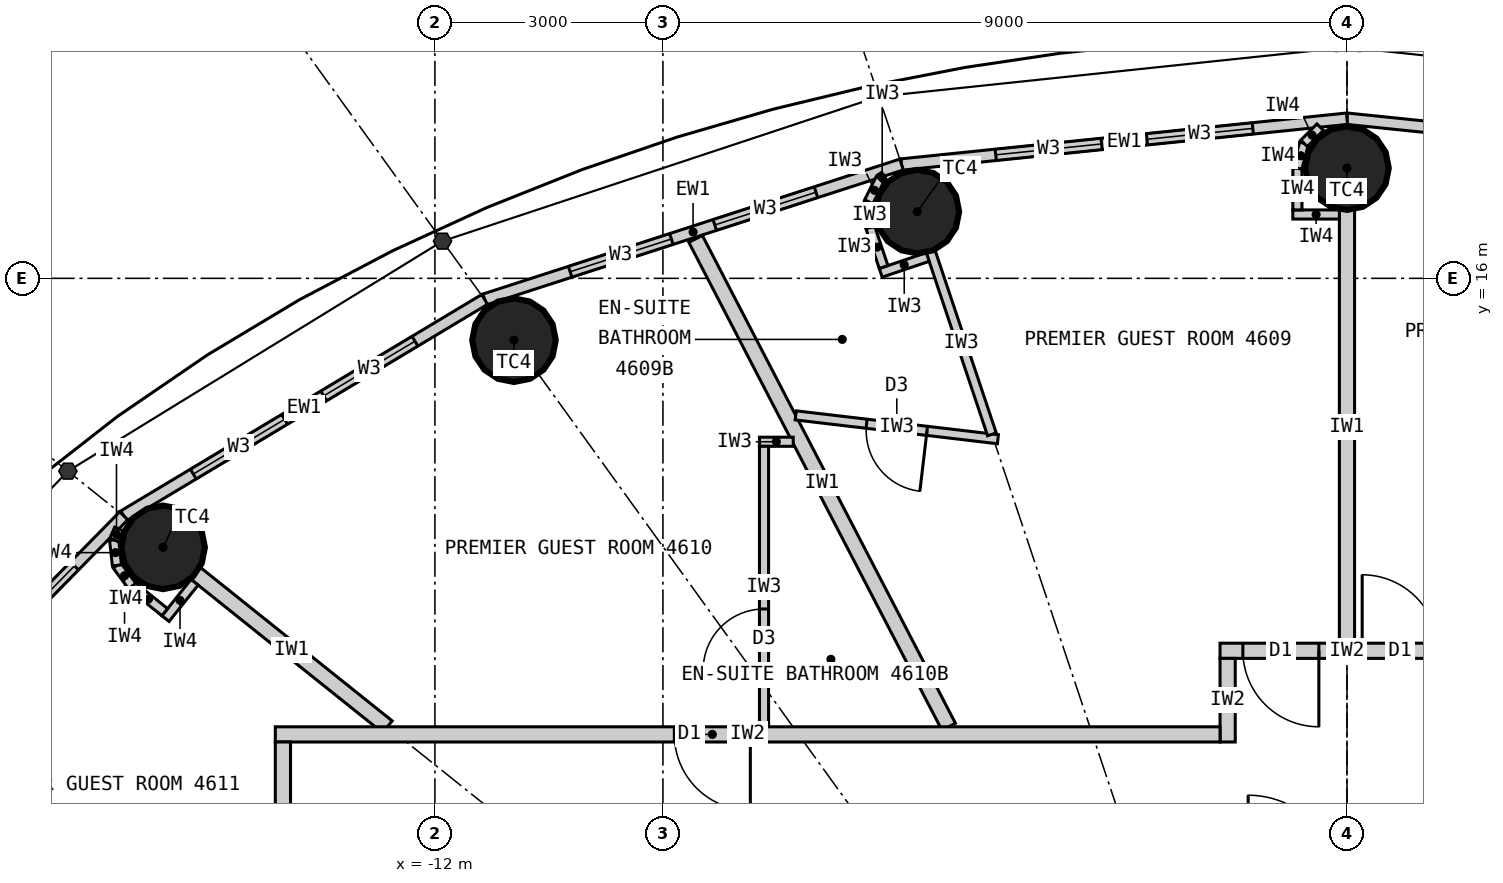
"""IFC4 building model, lengths in metres.
Left out: names, types, materials, properties, quantities, classifications, styles, units other than length and angle.
Written with IfcOpenShell. Run it as: python <this file> out.ifc"""

import sys

from ifc_helpers import new_model, si_unit, direction, frame, frame_2d, origin, origin_2d, place, context, subcontext, project, spatial, rectangle, circle, extrude, element, fill, save


model = new_model("IFC4")
c1 = context("Model", 3, precision=1e-05, world=origin(), true_north=direction((0.0, 1.0)))
c2 = subcontext(c1, "Body", "Model", "MODEL_VIEW")
j1 = project(units=[si_unit("LENGTHUNIT", "METRE"), si_unit("PLANEANGLEUNIT", "RADIAN")], contexts=[c1])
p1 = place(None, origin())
s1 = spatial("IfcSite", under=j1, at=p1, CompositionType="ELEMENT")
p2 = place(p1, origin())
s2 = spatial("IfcBuilding", under=s1, at=p2, CompositionType="ELEMENT")
p3 = place(p2, frame((0.0, 0.0, 173.1)))
s3 = spatial("IfcBuildingStorey", under=s2, at=p3, CompositionType="ELEMENT", Elevation=173.1)
for number, where, z_axis, x_axis in (
    (1, (0.0, 17.45, 0.0), (0.0, 0.0, 1.0), (1.0, 0.0, 0.0)),
    (2, (-5.653, 16.877, 0.0), (0.0, 0.0, 1.0), (1.0, 0.0, 0.0)),
    (3, (-10.96, 15.186, 0.0), (0.0, 0.0, 1.0), (1.0, 0.0, 0.0)),
    (4, (-15.576, 12.461, 0.0), (0.0, 0.0, 1.0), (1.0, 0.0, 0.0)),
):
    element("IfcColumn", number, at=place(p3, frame(where, z_axis=z_axis, x_axis=x_axis)), inside=s3, PredefinedType="COLUMN", context=c2, shape_type="SweptSolid", body=[
        extrude(circle(Radius=0.55, at=origin_2d()), origin(), (0.0, 0.0, 1.0), 3.3),
    ])
p4 = place(p3, frame((5.86, 17.497, 0.0), z_axis=(0.0, 0.0, 1.0), x_axis=(-0.994751738032, 0.102318032045, 0.0)))
e5 = element("IfcWall", 5, at=p4, inside=s3, PredefinedType="ELEMENTEDWALL", context=c2, shape_type="SweptSolid", body=[
    extrude(rectangle(XDim=5.891, YDim=0.15, at=frame_2d((2.946, 0.0))), origin(), (0.0, 0.0, 1.0), 3.12),
])
p5 = place(p4, frame((1.246, 0.0, 0.9)))
e6 = element("IfcOpeningElement", 6, at=p5, cuts=e5, PredefinedType="OPENING", context=c2, shape_type="SweptSolid", body=[
    extrude(rectangle(XDim=1.4, YDim=1.9, at=frame_2d((0.7, 0.95))), frame((0.0, 0.085, 0.0), z_axis=(0.0, -1.0, 0.0), x_axis=(1.0, 0.0, 0.0)), (0.0, 0.0, 1.0), 0.17),
])
p6 = place(p4, frame((3.246, 0.0, 0.9)))
e7 = element("IfcOpeningElement", 7, at=p6, cuts=e5, PredefinedType="OPENING", context=c2, shape_type="SweptSolid", body=[
    extrude(rectangle(XDim=1.4, YDim=1.9, at=frame_2d((0.7, 0.95))), frame((0.0, 0.085, 0.0), z_axis=(0.0, -1.0, 0.0), x_axis=(1.0, 0.0, 0.0)), (0.0, 0.0, 1.0), 0.17),
])
p7 = place(p3, frame((0.0, 18.1, 0.0), z_axis=(0.0, 0.0, 1.0), x_axis=(-0.994751738032, -0.102318032045, 0.0)))
e8 = element("IfcWall", 8, at=p7, inside=s3, PredefinedType="ELEMENTEDWALL", context=c2, shape_type="SweptSolid", body=[
    extrude(rectangle(XDim=5.891, YDim=0.15, at=frame_2d((2.946, 0.0))), origin(), (0.0, 0.0, 1.0), 3.12),
])
p8 = place(p7, frame((1.246, 0.0, 0.9)))
e9 = element("IfcOpeningElement", 9, at=p8, cuts=e8, PredefinedType="OPENING", context=c2, shape_type="SweptSolid", body=[
    extrude(rectangle(XDim=1.4, YDim=1.9, at=frame_2d((0.7, 0.95))), frame((0.0, 0.085, 0.0), z_axis=(0.0, -1.0, 0.0), x_axis=(1.0, 0.0, 0.0)), (0.0, 0.0, 1.0), 0.17),
])
p9 = place(p7, frame((3.246, 0.0, 0.9)))
e10 = element("IfcOpeningElement", 10, at=p9, cuts=e8, PredefinedType="OPENING", context=c2, shape_type="SweptSolid", body=[
    extrude(rectangle(XDim=1.4, YDim=1.9, at=frame_2d((0.7, 0.95))), frame((0.0, 0.085, 0.0), z_axis=(0.0, -1.0, 0.0), x_axis=(1.0, 0.0, 0.0)), (0.0, 0.0, 1.0), 0.17),
])
p10 = place(p3, frame((-5.86, 17.497, 0.0), z_axis=(0.0, 0.0, 1.0), x_axis=(-0.951432482129, -0.307857486429, 0.0)))
e11 = element("IfcWall", 11, at=p10, inside=s3, PredefinedType="ELEMENTEDWALL", context=c2, shape_type="SweptSolid", body=[
    extrude(rectangle(XDim=5.766, YDim=0.15, at=frame_2d((2.883, 0.0))), origin(), (0.0, 0.0, 1.0), 3.12),
])
p11 = place(p10, frame((1.183, 0.0, 0.9)))
e12 = element("IfcOpeningElement", 12, at=p11, cuts=e11, PredefinedType="OPENING", context=c2, shape_type="SweptSolid", body=[
    extrude(rectangle(XDim=1.4, YDim=1.9, at=frame_2d((0.7, 0.95))), frame((0.0, 0.085, 0.0), z_axis=(0.0, -1.0, 0.0), x_axis=(1.0, 0.0, 0.0)), (0.0, 0.0, 1.0), 0.17),
])
p12 = place(p10, frame((3.183, 0.0, 0.9)))
e13 = element("IfcOpeningElement", 13, at=p12, cuts=e11, PredefinedType="OPENING", context=c2, shape_type="SweptSolid", body=[
    extrude(rectangle(XDim=1.4, YDim=1.9, at=frame_2d((0.7, 0.95))), frame((0.0, 0.085, 0.0), z_axis=(0.0, -1.0, 0.0), x_axis=(1.0, 0.0, 0.0)), (0.0, 0.0, 1.0), 0.17),
])
p13 = place(p3, frame((-11.346, 15.722, 0.0), z_axis=(0.0, 0.0, 1.0), x_axis=(-0.857695199231, -0.514158482587, 0.0)))
e14 = element("IfcWall", 14, at=p13, inside=s3, PredefinedType="ELEMENTEDWALL", context=c2, shape_type="SweptSolid", body=[
    extrude(rectangle(XDim=5.536, YDim=0.15, at=frame_2d((2.768, 0.0))), origin(), (0.0, 0.0, 1.0), 3.12),
])
p14 = place(p13, frame((1.068, 0.0, 0.9)))
e15 = element("IfcOpeningElement", 15, at=p14, cuts=e14, PredefinedType="OPENING", context=c2, shape_type="SweptSolid", body=[
    extrude(rectangle(XDim=1.4, YDim=1.9, at=frame_2d((0.7, 0.95))), frame((0.0, 0.085, 0.0), z_axis=(0.0, -1.0, 0.0), x_axis=(1.0, 0.0, 0.0)), (0.0, 0.0, 1.0), 0.17),
])
p15 = place(p13, frame((3.068, 0.0, 0.9)))
e16 = element("IfcOpeningElement", 16, at=p15, cuts=e14, PredefinedType="OPENING", context=c2, shape_type="SweptSolid", body=[
    extrude(rectangle(XDim=1.4, YDim=1.9, at=frame_2d((0.7, 0.95))), frame((0.0, 0.085, 0.0), z_axis=(0.0, -1.0, 0.0), x_axis=(1.0, 0.0, 0.0)), (0.0, 0.0, 1.0), 0.17),
])
p16 = place(p3, frame((-16.095, 12.876, 0.0), z_axis=(0.0, 0.0, 1.0), x_axis=(-0.700727467776, -0.71342905457, 0.0)))
e17 = element("IfcWall", 17, at=p16, inside=s3, PredefinedType="ELEMENTEDWALL", context=c2, shape_type="SweptSolid", body=[
    extrude(rectangle(XDim=5.247, YDim=0.15, at=frame_2d((2.624, 0.0))), origin(), (0.0, 0.0, 1.0), 3.12),
])
p17 = place(p16, frame((0.924, 0.0, 0.9)))
e18 = element("IfcOpeningElement", 18, at=p17, cuts=e17, PredefinedType="OPENING", context=c2, shape_type="SweptSolid", body=[
    extrude(rectangle(XDim=1.4, YDim=1.9, at=frame_2d((0.7, 0.95))), frame((0.0, 0.085, 0.0), z_axis=(0.0, -1.0, 0.0), x_axis=(1.0, 0.0, 0.0)), (0.0, 0.0, 1.0), 0.17),
])
p18 = place(p16, frame((2.924, 0.0, 0.9)))
e19 = element("IfcOpeningElement", 19, at=p18, cuts=e17, PredefinedType="OPENING", context=c2, shape_type="SweptSolid", body=[
    extrude(rectangle(XDim=1.4, YDim=1.9, at=frame_2d((0.7, 0.95))), frame((0.0, 0.085, 0.0), z_axis=(0.0, -1.0, 0.0), x_axis=(1.0, 0.0, 0.0)), (0.0, 0.0, 1.0), 0.17),
])
p19 = place(p3, frame((0.0, 11.2, 0.0), z_axis=(0.0, 0.0, 1.0), x_axis=(0.0, 1.0, 0.0)))
e20 = element("IfcWall", 20, at=p19, inside=s3, PredefinedType="PARTITIONING", context=c2, shape_type="SweptSolid", body=[
    extrude(rectangle(XDim=5.7, YDim=0.2, at=frame_2d((2.85, 0.0))), origin(), (0.0, 0.0, 1.0), 2.42),
])
p20 = place(p3, frame((-5.24, 10.1, 0.0), z_axis=(0.0, 0.0, 1.0), x_axis=(-0.460532965373, 0.887642601391, 0.0)))
e21 = element("IfcWall", 21, at=p20, inside=s3, PredefinedType="PARTITIONING", context=c2, shape_type="SweptSolid", body=[
    extrude(rectangle(XDim=7.231, YDim=0.2, at=frame_2d((3.616, 0.0))), origin(), (0.0, 0.0, 1.0), 3.12),
])
p21 = place(p3, frame((-12.625, 10.1, 0.0), z_axis=(0.0, 0.0, 1.0), x_axis=(-0.780876185034, 0.624685827954, 0.0)))
e22 = element("IfcWall", 22, at=p21, inside=s3, PredefinedType="PARTITIONING", context=c2, shape_type="SweptSolid", body=[
    extrude(rectangle(XDim=3.229, YDim=0.2, at=frame_2d((1.615, 0.0))), origin(), (0.0, 0.0, 1.0), 2.42),
])
p22 = place(p3, frame((-1.67, 11.1, 0.0), z_axis=(0.0, 0.0, 1.0), x_axis=(1.0, 0.0, 0.0)))
e23 = element("IfcWall", 23, at=p22, inside=s3, PredefinedType="PARTITIONING", context=c2, shape_type="SweptSolid", body=[
    extrude(rectangle(XDim=3.34, YDim=0.2, at=frame_2d((1.67, 0.0))), origin(), (0.0, 0.0, 1.0), 3.12),
])
p23 = place(p22, frame((1.87, 0.0, 0.0)))
e24 = element("IfcOpeningElement", 24, at=p23, cuts=e23, PredefinedType="OPENING", context=c2, shape_type="SweptSolid", body=[
    extrude(rectangle(XDim=1.0, YDim=2.2, at=frame_2d((0.5, 1.1))), frame((0.0, 0.11, 0.0), z_axis=(0.0, -1.0, 0.0), x_axis=(1.0, 0.0, 0.0)), (0.0, 0.0, 1.0), 0.22),
])
p24 = place(p22, frame((0.3, 0.0, 0.0)))
e25 = element("IfcOpeningElement", 25, at=p24, cuts=e23, PredefinedType="OPENING", context=c2, shape_type="SweptSolid", body=[
    extrude(rectangle(XDim=1.0, YDim=2.2, at=frame_2d((0.5, 1.1))), frame((0.0, 0.11, 0.0), z_axis=(0.0, -1.0, 0.0), x_axis=(1.0, 0.0, 0.0)), (0.0, 0.0, 1.0), 0.22),
])
p25 = place(p3, frame((-1.57, 9.9, 0.0), z_axis=(0.0, 0.0, 1.0), x_axis=(0.0, 1.0, 0.0)))
e26 = element("IfcWall", 26, at=p25, inside=s3, PredefinedType="PARTITIONING", context=c2, shape_type="SweptSolid", body=[
    extrude(rectangle(XDim=1.1, YDim=0.2, at=frame_2d((0.55, 0.0))), origin(), (0.0, 0.0, 1.0), 3.12),
])
p26 = place(p3, frame((-7.253, 14.197, 0.0), z_axis=(0.0, 0.0, 1.0), x_axis=(0.993128188393, -0.117031625725, 0.0)))
e27 = element("IfcWall", 27, at=p26, inside=s3, PredefinedType="PARTITIONING", context=c2, shape_type="SweptSolid", body=[
    extrude(rectangle(XDim=2.678, YDim=0.12, at=frame_2d((1.339, 0.0))), origin(), (0.0, 0.0, 1.0), 3.12),
])
p27 = place(p26, frame((0.939, 0.0, 0.0)))
e28 = element("IfcOpeningElement", 28, at=p27, cuts=e27, PredefinedType="OPENING", context=c2, shape_type="SweptSolid", body=[
    extrude(rectangle(XDim=0.8, YDim=2.1, at=frame_2d((0.4, 1.05))), frame((0.0, 0.07, 0.0), z_axis=(0.0, -1.0, 0.0), x_axis=(1.0, 0.0, 0.0)), (0.0, 0.0, 1.0), 0.14),
])
p28 = place(p3, frame((-4.671, 13.948, 0.0), z_axis=(0.0, 0.0, 1.0), x_axis=(-0.317669167093, 0.948201613729, 0.0)))
e29 = element("IfcWall", 29, at=p28, inside=s3, PredefinedType="PARTITIONING", context=c2, shape_type="SweptSolid", body=[
    extrude(rectangle(XDim=2.54, YDim=0.12, at=frame_2d((1.27, 0.0))), origin(), (0.0, 0.0, 1.0), 2.42),
])
p29 = place(p3, frame((-5.516, 16.28, 0.0), z_axis=(0.0, 0.0, 1.0), x_axis=(-0.948157944392, -0.317799484717, 0.0)))
e30 = element("IfcWall", 30, at=p29, inside=s3, PredefinedType="PARTITIONING", context=c2, shape_type="SweptSolid", body=[
    extrude(rectangle(XDim=0.652, YDim=0.12, at=frame_2d((0.326, 0.0))), origin(), (0.0, 0.0, 1.0), 3.12),
])
p30 = place(p3, frame((-6.097, 16.149, 0.0), z_axis=(0.0, 0.0, 1.0), x_axis=(-0.317292604854, 0.948327687514, 0.0)))
e31 = element("IfcWall", 31, at=p30, inside=s3, PredefinedType="PARTITIONING", context=c2, shape_type="SweptSolid", body=[
    extrude(rectangle(XDim=0.55, YDim=0.12, at=frame_2d((0.275, 0.0))), origin(), (0.0, 0.0, 1.0), 3.12),
])
for number, where, z_axis, x_axis in (
    (32, (-6.271, 16.67, 0.0), (0.0, 0.0, 1.0), (-0.061, 0.998, 0.0)),
    (33, (-6.292, 17.007, 0.0), (0.0, 0.0, 1.0), (0.445, 0.895, 0.0)),
):
    element("IfcWall", number, at=place(p3, frame(where, z_axis=z_axis, x_axis=x_axis)), inside=s3, PredefinedType="PARTITIONING", context=c2, shape_type="SweptSolid", body=[
        extrude(rectangle(XDim=0.338, YDim=0.12, at=frame_2d((0.169, 0.0))), origin(), (0.0, 0.0, 1.0), 3.12),
    ])
p31 = place(p3, frame((-6.142, 17.31, 0.0), z_axis=(0.0, 0.0, 1.0), x_axis=(0.835039693181, 0.550189704386, 0.0)))
e34 = element("IfcWall", 34, at=p31, inside=s3, PredefinedType="PARTITIONING", context=c2, shape_type="SweptSolid", body=[
    extrude(rectangle(XDim=0.062, YDim=0.12, at=frame_2d((0.031, 0.0))), origin(), (0.0, 0.0, 1.0), 3.12),
])
p32 = place(p3, frame((-7.286, 13.85, 0.0), z_axis=(0.0, 0.0, 1.0), x_axis=(-1.0, 0.0, 0.0)))
e35 = element("IfcWall", 35, at=p32, inside=s3, PredefinedType="PARTITIONING", context=c2, shape_type="SweptSolid", body=[
    extrude(rectangle(XDim=0.444, YDim=0.12, at=frame_2d((0.222, 0.0))), origin(), (0.0, 0.0, 1.0), 3.12),
])
p33 = place(p3, frame((-7.67, 10.1, 0.0), z_axis=(0.0, 0.0, 1.0), x_axis=(0.0, 1.0, 0.0)))
e36 = element("IfcWall", 36, at=p33, inside=s3, PredefinedType="PARTITIONING", context=c2, shape_type="SweptSolid", body=[
    extrude(rectangle(XDim=3.69, YDim=0.12, at=frame_2d((1.845, 0.0))), origin(), (0.0, 0.0, 1.0), 3.12),
])
p34 = place(p33, frame((0.75, 0.0, 0.0)))
e37 = element("IfcOpeningElement", 37, at=p34, cuts=e36, PredefinedType="OPENING", context=c2, shape_type="SweptSolid", body=[
    extrude(rectangle(XDim=0.8, YDim=2.1, at=frame_2d((0.4, 1.05))), frame((0.0, 0.07, 0.0), z_axis=(0.0, -1.0, 0.0), x_axis=(1.0, 0.0, 0.0)), (0.0, 0.0, 1.0), 0.14),
])
p35 = place(p3, frame((-14.1, 10.0, 0.0), z_axis=(0.0, 0.0, 1.0), x_axis=(1.0, 0.0, 0.0)))
e38 = element("IfcWall", 38, at=p35, inside=s3, PredefinedType="PARTITIONING", context=c2, shape_type="SweptSolid", body=[
    extrude(rectangle(XDim=12.43, YDim=0.2, at=frame_2d((6.215, 0.0))), origin(), (0.0, 0.0, 1.0), 3.12),
])
p36 = place(p35, frame((5.25, 0.0, 0.0)))
e39 = element("IfcOpeningElement", 39, at=p36, cuts=e38, PredefinedType="OPENING", context=c2, shape_type="SweptSolid", body=[
    extrude(rectangle(XDim=1.0, YDim=2.2, at=frame_2d((0.5, 1.1))), frame((0.0, 0.11, 0.0), z_axis=(0.0, -1.0, 0.0), x_axis=(1.0, 0.0, 0.0)), (0.0, 0.0, 1.0), 0.22),
])
p37 = place(p3, frame((-14.0, 9.9, 0.0), z_axis=(0.0, 0.0, 1.0), x_axis=(0.0, -1.0, 0.0)))
e40 = element("IfcWall", 40, at=p37, inside=s3, PredefinedType="PARTITIONING", context=c2, shape_type="SweptSolid", body=[
    extrude(rectangle(XDim=8.23, YDim=0.2, at=frame_2d((4.115, 0.0))), origin(), (0.0, 0.0, 1.0), 3.12),
])
p38 = place(p37, frame((1.678, 0.0, 0.0)))
e41 = element("IfcOpeningElement", 41, at=p38, cuts=e40, PredefinedType="OPENING", context=c2, shape_type="SweptSolid", body=[
    extrude(rectangle(XDim=1.0, YDim=2.2, at=frame_2d((0.5, 1.1))), frame((0.0, 0.11, 0.0), z_axis=(0.0, -1.0, 0.0), x_axis=(1.0, 0.0, 0.0)), (0.0, 0.0, 1.0), 0.22),
])
p39 = place(p3, frame((-0.1, 16.84, 0.0), z_axis=(0.0, 0.0, 1.0), x_axis=(-1.0, 0.0, 0.0)))
e42 = element("IfcWall", 42, at=p39, inside=s3, PredefinedType="PARTITIONING", context=c2, shape_type="SweptSolid", body=[
    extrude(rectangle(XDim=0.612, YDim=0.12, at=frame_2d((0.306, 0.0))), origin(), (0.0, 0.0, 1.0), 3.12),
])
p40 = place(p3, frame((-0.652, 16.9, 0.0), z_axis=(0.0, 0.0, 1.0), x_axis=(0.0, 1.0, 0.0)))
e43 = element("IfcWall", 43, at=p40, inside=s3, PredefinedType="PARTITIONING", context=c2, shape_type="SweptSolid", body=[
    extrude(rectangle(XDim=0.55, YDim=0.12, at=frame_2d((0.275, 0.0))), origin(), (0.0, 0.0, 1.0), 3.12),
])
p41 = place(p3, frame((-0.652, 17.45, 0.0), z_axis=(0.0, 0.0, 1.0), x_axis=(0.258832454679, 0.965922233104, 0.0)))
e44 = element("IfcWall", 44, at=p41, inside=s3, PredefinedType="PARTITIONING", context=c2, shape_type="SweptSolid", body=[
    extrude(rectangle(XDim=0.338, YDim=0.12, at=frame_2d((0.169, 0.0))), origin(), (0.0, 0.0, 1.0), 3.12),
])
p42 = place(p3, frame((-0.565, 17.776, 0.0), z_axis=(0.0, 0.0, 1.0), x_axis=(0.707106781187, 0.707106781187, 0.0)))
e45 = element("IfcWall", 45, at=p42, inside=s3, PredefinedType="PARTITIONING", context=c2, shape_type="SweptSolid", body=[
    extrude(rectangle(XDim=0.301, YDim=0.12, at=frame_2d((0.15, 0.0))), origin(), (0.0, 0.0, 1.0), 3.12),
])
p43 = place(p3, frame((-15.162, 12.002, 0.0), z_axis=(0.0, 0.0, 1.0), x_axis=(-0.624597762427, -0.780946627607, 0.0)))
e46 = element("IfcWall", 46, at=p43, inside=s3, PredefinedType="PARTITIONING", context=c2, shape_type="SweptSolid", body=[
    extrude(rectangle(XDim=0.612, YDim=0.12, at=frame_2d((0.306, 0.0))), origin(), (0.0, 0.0, 1.0), 3.12),
])
p44 = place(p3, frame((-15.554, 11.608, 0.0), z_axis=(0.0, 0.0, 1.0), x_axis=(-0.780695577787, 0.624911525597, 0.0)))
e47 = element("IfcWall", 47, at=p44, inside=s3, PredefinedType="PARTITIONING", context=c2, shape_type="SweptSolid", body=[
    extrude(rectangle(XDim=0.55, YDim=0.12, at=frame_2d((0.275, 0.0))), origin(), (0.0, 0.0, 1.0), 3.12),
])
p45 = place(p3, frame((-15.984, 11.952, 0.0), z_axis=(0.0, 0.0, 1.0), x_axis=(-0.592335221171, 0.805691619517, 0.0)))
e48 = element("IfcWall", 48, at=p45, inside=s3, PredefinedType="PARTITIONING", context=c2, shape_type="SweptSolid", body=[
    extrude(rectangle(XDim=0.338, YDim=0.12, at=frame_2d((0.169, 0.0))), origin(), (0.0, 0.0, 1.0), 3.12),
])
p46 = place(p3, frame((-16.184, 12.224, 0.0), z_axis=(0.0, 0.0, 1.0), x_axis=(-0.110669692975, 0.993857242795, 0.0)))
e49 = element("IfcWall", 49, at=p46, inside=s3, PredefinedType="PARTITIONING", context=c2, shape_type="SweptSolid", body=[
    extrude(rectangle(XDim=0.337, YDim=0.12, at=frame_2d((0.169, 0.0))), origin(), (0.0, 0.0, 1.0), 3.12),
])
p47 = place(p3, frame((-16.221, 12.559, 0.0), z_axis=(0.0, 0.0, 1.0), x_axis=(0.401064416249, 0.916049853457, 0.0)))
e50 = element("IfcWall", 50, at=p47, inside=s3, PredefinedType="PARTITIONING", context=c2, shape_type="SweptSolid", body=[
    extrude(rectangle(XDim=0.156, YDim=0.12, at=frame_2d((0.078, 0.0))), origin(), (0.0, 0.0, 1.0), 3.12),
])
p48 = place(p8, origin())
e51 = element("IfcWindow", 51, at=p48, inside=s3, PartitioningType="SINGLE_PANEL", PredefinedType="WINDOW", context=c2, shape_type="SweptSolid", body=[
    extrude(rectangle(XDim=1.4, YDim=1.9, at=frame_2d((0.7, 0.95))), frame((0.0, 0.03, 0.0), z_axis=(0.0, -1.0, 0.0), x_axis=(1.0, 0.0, 0.0)), (0.0, 0.0, 1.0), 0.06),
])
fill(e9, e51)
p49 = place(p9, origin())
e52 = element("IfcWindow", 52, at=p49, inside=s3, PartitioningType="SINGLE_PANEL", PredefinedType="WINDOW", context=c2, shape_type="SweptSolid", body=[
    extrude(rectangle(XDim=1.4, YDim=1.9, at=frame_2d((0.7, 0.95))), frame((0.0, 0.03, 0.0), z_axis=(0.0, -1.0, 0.0), x_axis=(1.0, 0.0, 0.0)), (0.0, 0.0, 1.0), 0.06),
])
fill(e10, e52)
p50 = place(p11, origin())
e53 = element("IfcWindow", 53, at=p50, inside=s3, PartitioningType="SINGLE_PANEL", PredefinedType="WINDOW", context=c2, shape_type="SweptSolid", body=[
    extrude(rectangle(XDim=1.4, YDim=1.9, at=frame_2d((0.7, 0.95))), frame((0.0, 0.03, 0.0), z_axis=(0.0, -1.0, 0.0), x_axis=(1.0, 0.0, 0.0)), (0.0, 0.0, 1.0), 0.06),
])
fill(e12, e53)
p51 = place(p12, origin())
e54 = element("IfcWindow", 54, at=p51, inside=s3, PartitioningType="SINGLE_PANEL", PredefinedType="WINDOW", context=c2, shape_type="SweptSolid", body=[
    extrude(rectangle(XDim=1.4, YDim=1.9, at=frame_2d((0.7, 0.95))), frame((0.0, 0.03, 0.0), z_axis=(0.0, -1.0, 0.0), x_axis=(1.0, 0.0, 0.0)), (0.0, 0.0, 1.0), 0.06),
])
fill(e13, e54)
p52 = place(p14, origin())
e55 = element("IfcWindow", 55, at=p52, inside=s3, PartitioningType="SINGLE_PANEL", PredefinedType="WINDOW", context=c2, shape_type="SweptSolid", body=[
    extrude(rectangle(XDim=1.4, YDim=1.9, at=frame_2d((0.7, 0.95))), frame((0.0, 0.03, 0.0), z_axis=(0.0, -1.0, 0.0), x_axis=(1.0, 0.0, 0.0)), (0.0, 0.0, 1.0), 0.06),
])
fill(e15, e55)
p53 = place(p15, origin())
e56 = element("IfcWindow", 56, at=p53, inside=s3, PartitioningType="SINGLE_PANEL", PredefinedType="WINDOW", context=c2, shape_type="SweptSolid", body=[
    extrude(rectangle(XDim=1.4, YDim=1.9, at=frame_2d((0.7, 0.95))), frame((0.0, 0.03, 0.0), z_axis=(0.0, -1.0, 0.0), x_axis=(1.0, 0.0, 0.0)), (0.0, 0.0, 1.0), 0.06),
])
fill(e16, e56)
p54 = place(p17, origin())
e57 = element("IfcWindow", 57, at=p54, inside=s3, PartitioningType="SINGLE_PANEL", PredefinedType="WINDOW", context=c2, shape_type="SweptSolid", body=[
    extrude(rectangle(XDim=1.4, YDim=1.9, at=frame_2d((0.7, 0.95))), frame((0.0, 0.03, 0.0), z_axis=(0.0, -1.0, 0.0), x_axis=(1.0, 0.0, 0.0)), (0.0, 0.0, 1.0), 0.06),
])
fill(e18, e57)
p55 = place(p23, origin())
e58 = element("IfcDoor", 58, at=p55, inside=s3, OperationType="SINGLE_SWING_LEFT", PredefinedType="DOOR", context=c2, shape_type="SweptSolid", body=[
    extrude(rectangle(XDim=1.0, YDim=2.2, at=frame_2d((0.5, 1.1))), frame((0.0, 0.025, 0.0), z_axis=(0.0, -1.0, 0.0), x_axis=(1.0, 0.0, 0.0)), (0.0, 0.0, 1.0), 0.05),
])
fill(e24, e58)
p56 = place(p27, origin())
e59 = element("IfcDoor", 59, at=p56, inside=s3, OperationType="SINGLE_SWING_RIGHT", PredefinedType="DOOR", context=c2, shape_type="SweptSolid", body=[
    extrude(rectangle(XDim=0.8, YDim=2.1, at=frame_2d((0.4, 1.05))), frame((0.0, 0.025, 0.0), z_axis=(0.0, -1.0, 0.0), x_axis=(1.0, 0.0, 0.0)), (0.0, 0.0, 1.0), 0.05),
])
fill(e28, e59)
p57 = place(p24, origin())
e60 = element("IfcDoor", 60, at=p57, inside=s3, OperationType="SINGLE_SWING_RIGHT", PredefinedType="DOOR", context=c2, shape_type="SweptSolid", body=[
    extrude(rectangle(XDim=1.0, YDim=2.2, at=frame_2d((0.5, 1.1))), frame((0.0, 0.025, 0.0), z_axis=(0.0, -1.0, 0.0), x_axis=(1.0, 0.0, 0.0)), (0.0, 0.0, 1.0), 0.05),
])
fill(e25, e60)
p58 = place(p34, origin())
e61 = element("IfcDoor", 61, at=p58, inside=s3, OperationType="SINGLE_SWING_LEFT", PredefinedType="DOOR", context=c2, shape_type="SweptSolid", body=[
    extrude(rectangle(XDim=0.8, YDim=2.1, at=frame_2d((0.4, 1.05))), frame((0.0, 0.025, 0.0), z_axis=(0.0, -1.0, 0.0), x_axis=(1.0, 0.0, 0.0)), (0.0, 0.0, 1.0), 0.05),
])
fill(e37, e61)
p59 = place(p36, origin())
e62 = element("IfcDoor", 62, at=p59, inside=s3, OperationType="SINGLE_SWING_RIGHT", PredefinedType="DOOR", context=c2, shape_type="SweptSolid", body=[
    extrude(rectangle(XDim=1.0, YDim=2.2, at=frame_2d((0.5, 1.1))), frame((0.0, 0.025, 0.0), z_axis=(0.0, -1.0, 0.0), x_axis=(1.0, 0.0, 0.0)), (0.0, 0.0, 1.0), 0.05),
])
fill(e39, e62)
save(model, sys.argv[1])
